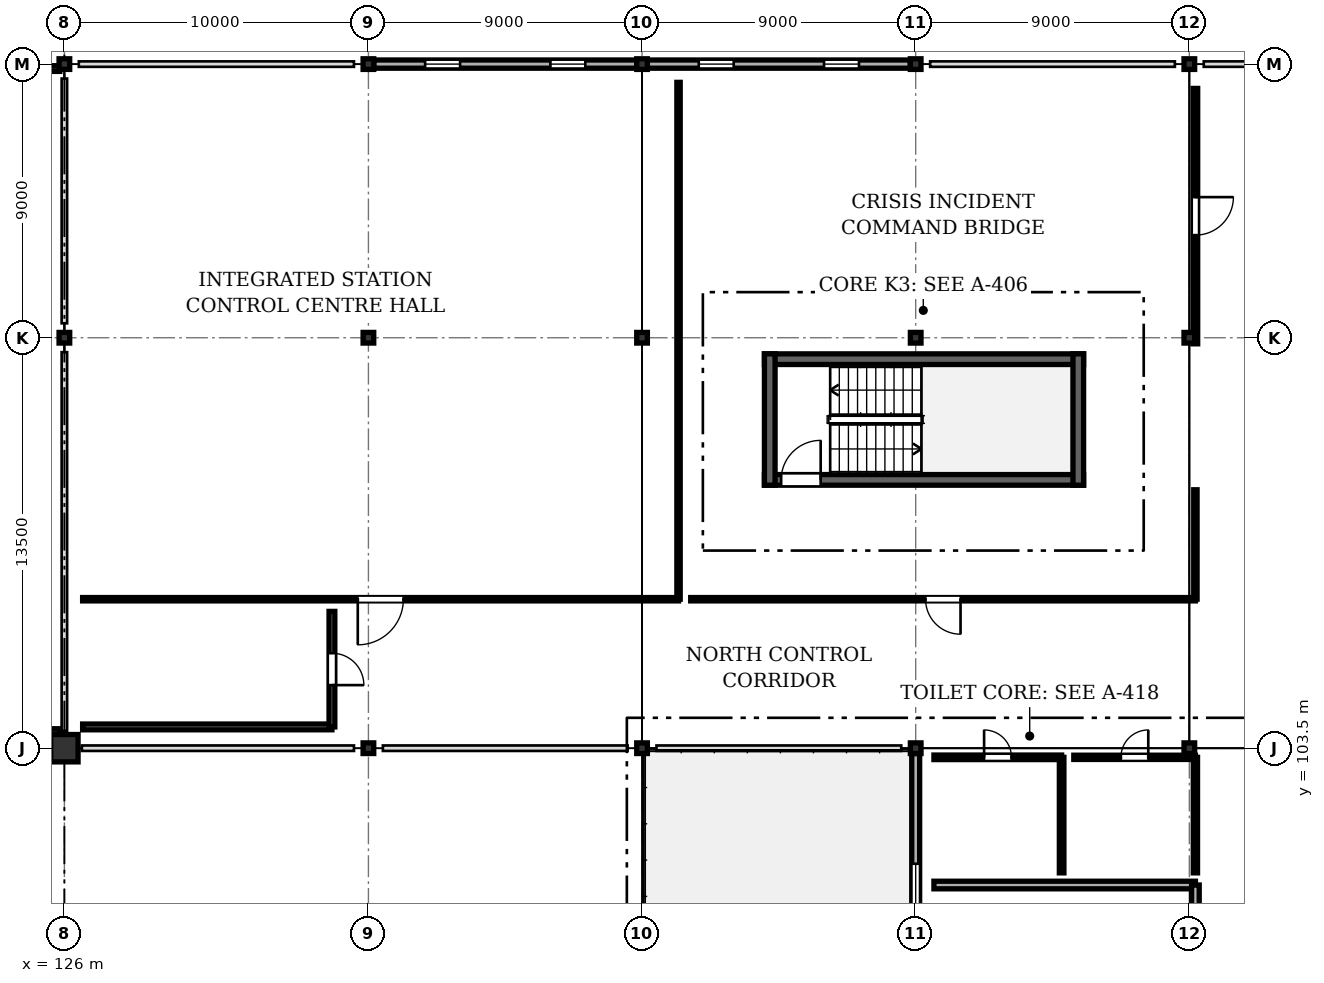
"""IFC4 building model, lengths in metres.
Left out: names, types, materials, properties, quantities, classifications, styles, units other than length and angle.
Written with IfcOpenShell. Run it as: python <this file> out.ifc"""

import sys

from ifc_helpers import new_model, si_unit, direction, frame, frame_2d, origin, origin_2d, place, context, subcontext, project, spatial, rectangle, i_section, extrude, element, fill, save


model = new_model("IFC4")
c1 = context("Model", 3, precision=1e-05, world=origin(), true_north=direction((0.0, 1.0)))
c2 = subcontext(c1, "Body", "Model", "MODEL_VIEW")
j1 = project(units=[si_unit("LENGTHUNIT", "METRE"), si_unit("PLANEANGLEUNIT", "RADIAN")], contexts=[c1])
p1 = place(None, origin())
s1 = spatial("IfcSite", under=j1, at=p1, CompositionType="ELEMENT")
p2 = place(p1, origin())
s2 = spatial("IfcBuilding", under=s1, at=p2, CompositionType="ELEMENT")
p3 = place(p2, frame((0.0, 0.0, 17.6)))
s3 = spatial("IfcBuildingStorey", under=s2, at=p3, CompositionType="ELEMENT", Elevation=17.6)
p4 = place(p3, frame((126.0, 103.5, 0.0), z_axis=(0.0, 0.0, 1.0), x_axis=(1.0, 0.0, 0.0)))
e1 = element("IfcColumn", 1, at=p4, inside=s3, PredefinedType="COLUMN", context=c2, shape_type="SweptSolid", body=[
    extrude(rectangle(XDim=0.9, YDim=0.9, at=origin_2d()), origin(), (0.0, 0.0, 1.0), 3.2),
])
for number, where, z_axis, x_axis in (
    (2, (126.0, 117.0, 0.0), (0.0, 0.0, 1.0), (1.0, 0.0, 0.0)),
    (3, (126.0, 126.0, 0.0), (0.0, 0.0, 1.0), (1.0, 0.0, 0.0)),
    (4, (136.0, 103.5, 0.0), (0.0, 0.0, 1.0), (1.0, 0.0, 0.0)),
    (5, (136.0, 117.0, 0.0), (0.0, 0.0, 1.0), (1.0, 0.0, 0.0)),
    (6, (136.0, 126.0, 0.0), (0.0, 0.0, 1.0), (1.0, 0.0, 0.0)),
    (7, (145.0, 103.5, 0.0), (0.0, 0.0, 1.0), (1.0, 0.0, 0.0)),
    (8, (145.0, 117.0, 0.0), (0.0, 0.0, 1.0), (1.0, 0.0, 0.0)),
    (9, (145.0, 126.0, 0.0), (0.0, 0.0, 1.0), (1.0, 0.0, 0.0)),
    (10, (154.0, 103.5, 0.0), (0.0, 0.0, 1.0), (1.0, 0.0, 0.0)),
    (11, (154.0, 117.0, 0.0), (0.0, 0.0, 1.0), (1.0, 0.0, 0.0)),
    (12, (154.0, 126.0, 0.0), (0.0, 0.0, 1.0), (1.0, 0.0, 0.0)),
    (13, (163.0, 103.5, 0.0), (0.0, 0.0, 1.0), (1.0, 0.0, 0.0)),
    (14, (163.0, 117.0, 0.0), (0.0, 0.0, 1.0), (1.0, 0.0, 0.0)),
    (15, (163.0, 126.0, 0.0), (0.0, 0.0, 1.0), (1.0, 0.0, 0.0)),
):
    element("IfcColumn", number, at=place(p3, frame(where, z_axis=z_axis, x_axis=x_axis)), inside=s3, PredefinedType="COLUMN", context=c2, shape_type="SweptSolid", body=[
        extrude(i_section(OverallWidth=0.35, OverallDepth=0.35, WebThickness=0.012, FlangeThickness=0.019, FilletRadius=0.02, at=origin_2d()), origin(), (0.0, 0.0, 1.0), 3.2),
    ])
p5 = place(p3, frame((136.175, 126.0, 0.0), z_axis=(0.0, 0.0, 1.0), x_axis=(1.0, 0.0, 0.0)))
e16 = element("IfcWall", 16, at=p5, inside=s3, PredefinedType="SOLIDWALL", context=c2, shape_type="SweptSolid", body=[
    extrude(rectangle(XDim=8.65, YDim=0.27, at=frame_2d((4.325, 0.0))), origin(), (0.0, 0.0, 1.0), 2.535),
])
p6 = place(p5, frame((1.69, 0.0, 0.9)))
e17 = element("IfcOpeningElement", 17, at=p6, cuts=e16, PredefinedType="OPENING", context=c2, shape_type="SweptSolid", body=[
    extrude(rectangle(XDim=1.15, YDim=1.45, at=frame_2d((0.575, 0.725))), frame((0.0, 0.145, 0.0), z_axis=(0.0, -1.0, 0.0), x_axis=(1.0, 0.0, 0.0)), (0.0, 0.0, 1.0), 0.29),
])
p7 = place(p5, frame((5.81, 0.0, 0.9)))
e18 = element("IfcOpeningElement", 18, at=p7, cuts=e16, PredefinedType="OPENING", context=c2, shape_type="SweptSolid", body=[
    extrude(rectangle(XDim=1.15, YDim=1.45, at=frame_2d((0.575, 0.725))), frame((0.0, 0.145, 0.0), z_axis=(0.0, -1.0, 0.0), x_axis=(1.0, 0.0, 0.0)), (0.0, 0.0, 1.0), 0.29),
])
p8 = place(p3, frame((145.175, 126.0, 0.0), z_axis=(0.0, 0.0, 1.0), x_axis=(1.0, 0.0, 0.0)))
e19 = element("IfcWall", 19, at=p8, inside=s3, PredefinedType="SOLIDWALL", context=c2, shape_type="SweptSolid", body=[
    extrude(rectangle(XDim=8.65, YDim=0.27, at=frame_2d((4.325, 0.0))), origin(), (0.0, 0.0, 1.0), 2.535),
])
p9 = place(p8, frame((1.69, 0.0, 0.9)))
e20 = element("IfcOpeningElement", 20, at=p9, cuts=e19, PredefinedType="OPENING", context=c2, shape_type="SweptSolid", body=[
    extrude(rectangle(XDim=1.15, YDim=1.45, at=frame_2d((0.575, 0.725))), frame((0.0, 0.145, 0.0), z_axis=(0.0, -1.0, 0.0), x_axis=(1.0, 0.0, 0.0)), (0.0, 0.0, 1.0), 0.29),
])
p10 = place(p8, frame((5.81, 0.0, 0.9)))
e21 = element("IfcOpeningElement", 21, at=p10, cuts=e19, PredefinedType="OPENING", context=c2, shape_type="SweptSolid", body=[
    extrude(rectangle(XDim=1.15, YDim=1.45, at=frame_2d((0.575, 0.725))), frame((0.0, 0.145, 0.0), z_axis=(0.0, -1.0, 0.0), x_axis=(1.0, 0.0, 0.0)), (0.0, 0.0, 1.0), 0.29),
])
p11 = place(p3, frame((154.0, 94.675, 0.0), z_axis=(0.0, 0.0, 1.0), x_axis=(0.0, 1.0, 0.0)))
e22 = element("IfcWall", 22, at=p11, inside=s3, PredefinedType="SOLIDWALL", context=c2, shape_type="SweptSolid", body=[
    extrude(rectangle(XDim=8.65, YDim=0.26, at=frame_2d((4.325, 0.0))), origin(), (0.0, 0.0, 1.0), 2.505),
])
p12 = place(p11, frame((3.625, 0.0, 0.75)))
e23 = element("IfcOpeningElement", 23, at=p12, cuts=e22, PredefinedType="OPENING", context=c2, shape_type="SweptSolid", body=[
    extrude(rectangle(XDim=1.4, YDim=1.55, at=frame_2d((0.7, 0.775))), frame((0.0, 0.14, 0.0), z_axis=(0.0, -1.0, 0.0), x_axis=(1.0, 0.0, 0.0)), (0.0, 0.0, 1.0), 0.28),
])
p13 = place(p3, frame((117.15, 104.05, 0.0), z_axis=(0.0, 0.0, 1.0), x_axis=(1.0, 0.0, 0.0)))
e24 = element("IfcWall", 24, at=p13, inside=s3, PredefinedType="PARAPET", context=c2, shape_type="SweptSolid", body=[
    extrude(rectangle(XDim=8.7, YDim=0.18, at=frame_2d((4.35, 0.0))), origin(), (0.0, 0.0, 1.0), 0.85),
])
p14 = place(p3, frame((117.15, 125.85, 0.0), z_axis=(0.0, 0.0, 1.0), x_axis=(1.0, 0.0, 0.0)))
e25 = element("IfcWall", 25, at=p14, inside=s3, PredefinedType="PARAPET", context=c2, shape_type="SweptSolid", body=[
    extrude(rectangle(XDim=8.7, YDim=0.18, at=frame_2d((4.35, 0.0))), origin(), (0.0, 0.0, 1.0), 1.15),
])
p15 = place(p3, frame((149.025, 112.325, 0.0), z_axis=(0.0, 0.0, 1.0), x_axis=(1.0, 0.0, 0.0)))
e26 = element("IfcWall", 26, at=p15, inside=s3, PredefinedType="SHEAR", context=c2, shape_type="SweptSolid", body=[
    extrude(rectangle(XDim=10.498, YDim=0.35, at=frame_2d((5.249, 0.0))), origin(), (0.0, 0.0, 1.0), 3.02),
])
p16 = place(p15, frame((0.55, 0.0, 0.0)))
e27 = element("IfcOpeningElement", 27, at=p16, cuts=e26, PredefinedType="OPENING", context=c2, shape_type="SweptSolid", body=[
    extrude(rectangle(XDim=1.3, YDim=2.1, at=frame_2d((0.65, 1.05))), frame((0.0, 0.185, 0.0), z_axis=(0.0, -1.0, 0.0), x_axis=(1.0, 0.0, 0.0)), (0.0, 0.0, 1.0), 0.37),
])
p17 = place(p3, frame((159.522, 116.295, 0.0), z_axis=(0.0, 0.0, 1.0), x_axis=(-1.0, 0.0, 0.0)))
e28 = element("IfcWall", 28, at=p17, inside=s3, PredefinedType="SHEAR", context=c2, shape_type="SweptSolid", body=[
    extrude(rectangle(XDim=10.498, YDim=0.35, at=frame_2d((5.249, 0.0))), origin(), (0.0, 0.0, 1.0), 3.02),
])
for number, where, z_axis, x_axis in (
    (29, (159.347, 112.15, 0.0), (0.0, 0.0, 1.0), (0.0, 1.0, 0.0)),
    (30, (149.2, 116.47, 0.0), (0.0, 0.0, 1.0), (0.0, -1.0, 0.0)),
):
    element("IfcWall", number, at=place(p3, frame(where, z_axis=z_axis, x_axis=x_axis)), inside=s3, PredefinedType="SHEAR", context=c2, shape_type="SweptSolid", body=[
        extrude(rectangle(XDim=4.32, YDim=0.35, at=frame_2d((2.16, 0.0))), origin(), (0.0, 0.0, 1.0), 3.02),
    ])
p18 = place(p3, frame((146.2, 108.4, 0.0), z_axis=(0.0, 0.0, 1.0), x_axis=(-1.0, 0.0, 0.0)))
e31 = element("IfcWall", 31, at=p18, inside=s3, PredefinedType="PARTITIONING", context=c2, shape_type="SweptSolid", body=[
    extrude(rectangle(XDim=19.6, YDim=0.11, at=frame_2d((9.8, 0.0))), origin(), (0.0, 0.0, 1.0), 2.395),
])
p19 = place(p18, frame((9.05, 0.0, 0.0)))
e32 = element("IfcOpeningElement", 32, at=p19, cuts=e31, PredefinedType="OPENING", context=c2, shape_type="SweptSolid", body=[
    extrude(rectangle(XDim=1.5, YDim=2.15, at=frame_2d((0.75, 1.075))), frame((0.0, 0.065, 0.0), z_axis=(0.0, -1.0, 0.0), x_axis=(1.0, 0.0, 0.0)), (0.0, 0.0, 1.0), 0.13),
])
p20 = place(p3, frame((146.2, 125.4, 0.0), z_axis=(0.0, 0.0, 1.0), x_axis=(0.0, -1.0, 0.0)))
e33 = element("IfcWall", 33, at=p20, inside=s3, PredefinedType="PARTITIONING", context=c2, shape_type="SweptSolid", body=[
    extrude(rectangle(XDim=17.0, YDim=0.11, at=frame_2d((8.5, 0.0))), origin(), (0.0, 0.0, 1.0), 2.535),
])
p21 = place(p3, frame((154.6, 99.0, 0.0), z_axis=(0.0, 0.0, 1.0), x_axis=(1.0, 0.0, 0.0)))
e34 = element("IfcWall", 34, at=p21, inside=s3, PredefinedType="SOLIDWALL", context=c2, shape_type="SweptSolid", body=[
    extrude(rectangle(XDim=8.6, YDim=0.25, at=frame_2d((4.3, 0.0))), origin(), (0.0, 0.0, 1.0), 2.555),
])
p22 = place(p3, frame((163.2, 99.0, 0.0), z_axis=(0.0, 0.0, 1.0), x_axis=(0.0, -1.0, 0.0)))
e35 = element("IfcWall", 35, at=p22, inside=s3, PredefinedType="SOLIDWALL", context=c2, shape_type="SweptSolid", body=[
    extrude(rectangle(XDim=8.4, YDim=0.25, at=frame_2d((4.2, 0.0))), origin(), (0.0, 0.0, 1.0), 2.505),
])
p23 = place(p22, frame((2.55, 0.0, 0.0)))
e36 = element("IfcOpeningElement", 36, at=p23, cuts=e35, PredefinedType="OPENING", context=c2, shape_type="SweptSolid", body=[
    extrude(rectangle(XDim=1.3, YDim=2.1, at=frame_2d((0.65, 1.05))), frame((0.0, 0.135, 0.0), z_axis=(0.0, -1.0, 0.0), x_axis=(1.0, 0.0, 0.0)), (0.0, 0.0, 1.0), 0.27),
])
p24 = place(p3, frame((163.2, 125.2, 0.0), z_axis=(0.0, 0.0, 1.0), x_axis=(0.0, -1.0, 0.0)))
e37 = element("IfcWall", 37, at=p24, inside=s3, PredefinedType="PARTITIONING", context=c2, shape_type="SweptSolid", body=[
    extrude(rectangle(XDim=8.4, YDim=0.15, at=frame_2d((4.2, 0.0))), origin(), (0.0, 0.0, 1.0), 2.355),
])
p25 = place(p24, frame((3.575, 0.0, 0.0)))
e38 = element("IfcOpeningElement", 38, at=p25, cuts=e37, PredefinedType="OPENING", context=c2, shape_type="SweptSolid", body=[
    extrude(rectangle(XDim=1.25, YDim=2.1, at=frame_2d((0.625, 1.05))), frame((0.0, 0.085, 0.0), z_axis=(0.0, -1.0, 0.0), x_axis=(1.0, 0.0, 0.0)), (0.0, 0.0, 1.0), 0.17),
])
p26 = place(p3, frame((163.2, 108.4, 0.0), z_axis=(0.0, 0.0, 1.0), x_axis=(-1.0, 0.0, 0.0)))
e39 = element("IfcWall", 39, at=p26, inside=s3, PredefinedType="PARTITIONING", context=c2, shape_type="SweptSolid", body=[
    extrude(rectangle(XDim=16.6, YDim=0.11, at=frame_2d((8.3, 0.0))), origin(), (0.0, 0.0, 1.0), 2.355),
])
p27 = place(p26, frame((7.725, 0.0, 0.0)))
e40 = element("IfcOpeningElement", 40, at=p27, cuts=e39, PredefinedType="OPENING", context=c2, shape_type="SweptSolid", body=[
    extrude(rectangle(XDim=1.15, YDim=2.1, at=frame_2d((0.575, 1.05))), frame((0.0, 0.065, 0.0), z_axis=(0.0, -1.0, 0.0), x_axis=(1.0, 0.0, 0.0)), (0.0, 0.0, 1.0), 0.13),
])
p28 = place(p3, frame((163.2, 112.0, 0.0), z_axis=(0.0, 0.0, 1.0), x_axis=(0.0, -1.0, 0.0)))
e41 = element("IfcWall", 41, at=p28, inside=s3, PredefinedType="PARTITIONING", context=c2, shape_type="SweptSolid", body=[
    extrude(rectangle(XDim=3.6, YDim=0.11, at=frame_2d((1.8, 0.0))), origin(), (0.0, 0.0, 1.0), 2.355),
])
p29 = place(p3, frame((154.6, 103.2, 0.0), z_axis=(0.0, 0.0, 1.0), x_axis=(1.0, 0.0, 0.0)))
e42 = element("IfcWall", 42, at=p29, inside=s3, PredefinedType="PARTITIONING", context=c2, shape_type="SweptSolid", body=[
    extrude(rectangle(XDim=4.2, YDim=0.15, at=frame_2d((2.1, 0.0))), origin(), (0.0, 0.0, 1.0), 2.505),
])
p30 = place(p29, frame((1.65, 0.0, 0.0)))
e43 = element("IfcOpeningElement", 43, at=p30, cuts=e42, PredefinedType="OPENING", context=c2, shape_type="SweptSolid", body=[
    extrude(rectangle(XDim=0.9, YDim=2.1, at=frame_2d((0.45, 1.05))), frame((0.0, 0.085, 0.0), z_axis=(0.0, -1.0, 0.0), x_axis=(1.0, 0.0, 0.0)), (0.0, 0.0, 1.0), 0.17),
])
p31 = place(p3, frame((158.8, 103.2, 0.0), z_axis=(0.0, 0.0, 1.0), x_axis=(0.0, -1.0, 0.0)))
e44 = element("IfcWall", 44, at=p31, inside=s3, PredefinedType="PARTITIONING", context=c2, shape_type="SweptSolid", body=[
    extrude(rectangle(XDim=3.8, YDim=0.15, at=frame_2d((1.9, 0.0))), origin(), (0.0, 0.0, 1.0), 2.505),
])
p32 = place(p3, frame((159.2, 103.2, 0.0), z_axis=(0.0, 0.0, 1.0), x_axis=(1.0, 0.0, 0.0)))
e45 = element("IfcWall", 45, at=p32, inside=s3, PredefinedType="PARTITIONING", context=c2, shape_type="SweptSolid", body=[
    extrude(rectangle(XDim=4.0, YDim=0.14, at=frame_2d((2.0, 0.0))), origin(), (0.0, 0.0, 1.0), 2.355),
])
p33 = place(p32, frame((1.55, 0.0, 0.0)))
e46 = element("IfcOpeningElement", 46, at=p33, cuts=e45, PredefinedType="OPENING", context=c2, shape_type="SweptSolid", body=[
    extrude(rectangle(XDim=0.9, YDim=2.1, at=frame_2d((0.45, 1.05))), frame((0.0, 0.08, 0.0), z_axis=(0.0, -1.0, 0.0), x_axis=(1.0, 0.0, 0.0)), (0.0, 0.0, 1.0), 0.16),
])
p34 = place(p3, frame((163.2, 103.2, 0.0), z_axis=(0.0, 0.0, 1.0), x_axis=(0.0, -1.0, 0.0)))
e47 = element("IfcWall", 47, at=p34, inside=s3, PredefinedType="PARTITIONING", context=c2, shape_type="SweptSolid", body=[
    extrude(rectangle(XDim=3.8, YDim=0.14, at=frame_2d((1.9, 0.0))), origin(), (0.0, 0.0, 1.0), 2.355),
])
p35 = place(p3, frame((134.8, 104.2, 0.0), z_axis=(0.0, 0.0, 1.0), x_axis=(-1.0, 0.0, 0.0)))
e48 = element("IfcWall", 48, at=p35, inside=s3, PredefinedType="PARTITIONING", context=c2, shape_type="SweptSolid", body=[
    extrude(rectangle(XDim=8.2, YDim=0.19, at=frame_2d((4.1, 0.0))), origin(), (0.0, 0.0, 1.0), 2.41),
])
p36 = place(p3, frame((134.8, 108.0, 0.0), z_axis=(0.0, 0.0, 1.0), x_axis=(0.0, -1.0, 0.0)))
e49 = element("IfcWall", 49, at=p36, inside=s3, PredefinedType="PARTITIONING", context=c2, shape_type="SweptSolid", body=[
    extrude(rectangle(XDim=3.8, YDim=0.19, at=frame_2d((1.9, 0.0))), origin(), (0.0, 0.0, 1.0), 2.51),
])
p37 = place(p36, frame((1.375, 0.0, 0.0)))
e50 = element("IfcOpeningElement", 50, at=p37, cuts=e49, PredefinedType="OPENING", context=c2, shape_type="SweptSolid", body=[
    extrude(rectangle(XDim=1.05, YDim=2.1, at=frame_2d((0.525, 1.05))), frame((0.0, 0.105, 0.0), z_axis=(0.0, -1.0, 0.0), x_axis=(1.0, 0.0, 0.0)), (0.0, 0.0, 1.0), 0.21),
])
p38 = place(p6, origin())
e51 = element("IfcWindow", 51, at=p38, inside=s3, PartitioningType="SINGLE_PANEL", PredefinedType="WINDOW", context=c2, shape_type="SweptSolid", body=[
    extrude(rectangle(XDim=1.15, YDim=1.45, at=frame_2d((0.575, 0.725))), frame((0.0, 0.03, 0.0), z_axis=(0.0, -1.0, 0.0), x_axis=(1.0, 0.0, 0.0)), (0.0, 0.0, 1.0), 0.06),
])
fill(e17, e51)
p39 = place(p7, origin())
e52 = element("IfcWindow", 52, at=p39, inside=s3, PartitioningType="SINGLE_PANEL", PredefinedType="WINDOW", context=c2, shape_type="SweptSolid", body=[
    extrude(rectangle(XDim=1.15, YDim=1.45, at=frame_2d((0.575, 0.725))), frame((0.0, 0.03, 0.0), z_axis=(0.0, -1.0, 0.0), x_axis=(1.0, 0.0, 0.0)), (0.0, 0.0, 1.0), 0.06),
])
fill(e18, e52)
p40 = place(p9, origin())
e53 = element("IfcWindow", 53, at=p40, inside=s3, PartitioningType="SINGLE_PANEL", PredefinedType="WINDOW", context=c2, shape_type="SweptSolid", body=[
    extrude(rectangle(XDim=1.15, YDim=1.45, at=frame_2d((0.575, 0.725))), frame((0.0, 0.03, 0.0), z_axis=(0.0, -1.0, 0.0), x_axis=(1.0, 0.0, 0.0)), (0.0, 0.0, 1.0), 0.06),
])
fill(e20, e53)
p41 = place(p10, origin())
e54 = element("IfcWindow", 54, at=p41, inside=s3, PartitioningType="SINGLE_PANEL", PredefinedType="WINDOW", context=c2, shape_type="SweptSolid", body=[
    extrude(rectangle(XDim=1.15, YDim=1.45, at=frame_2d((0.575, 0.725))), frame((0.0, 0.03, 0.0), z_axis=(0.0, -1.0, 0.0), x_axis=(1.0, 0.0, 0.0)), (0.0, 0.0, 1.0), 0.06),
])
fill(e21, e54)
p42 = place(p12, origin())
e55 = element("IfcWindow", 55, at=p42, inside=s3, PartitioningType="SINGLE_PANEL", PredefinedType="WINDOW", context=c2, shape_type="SweptSolid", body=[
    extrude(rectangle(XDim=1.4, YDim=1.55, at=frame_2d((0.7, 0.775))), frame((0.0, 0.03, 0.0), z_axis=(0.0, -1.0, 0.0), x_axis=(1.0, 0.0, 0.0)), (0.0, 0.0, 1.0), 0.06),
])
fill(e23, e55)
p43 = place(p16, origin())
e56 = element("IfcDoor", 56, at=p43, inside=s3, OperationType="SINGLE_SWING_RIGHT", PredefinedType="DOOR", context=c2, shape_type="SweptSolid", body=[
    extrude(rectangle(XDim=1.3, YDim=2.1, at=frame_2d((0.65, 1.05))), frame((0.0, 0.025, 0.0), z_axis=(0.0, -1.0, 0.0), x_axis=(1.0, 0.0, 0.0)), (0.0, 0.0, 1.0), 0.05),
])
fill(e27, e56)
p44 = place(p19, origin())
e57 = element("IfcDoor", 57, at=p44, inside=s3, OperationType="SINGLE_SWING_RIGHT", PredefinedType="DOOR", context=c2, shape_type="SweptSolid", body=[
    extrude(rectangle(XDim=1.5, YDim=2.15, at=frame_2d((0.75, 1.075))), frame((0.0, 0.025, 0.0), z_axis=(0.0, -1.0, 0.0), x_axis=(1.0, 0.0, 0.0)), (0.0, 0.0, 1.0), 0.05),
])
fill(e32, e57)
p45 = place(p25, origin())
e58 = element("IfcDoor", 58, at=p45, inside=s3, OperationType="SINGLE_SWING_LEFT", PredefinedType="DOOR", context=c2, shape_type="SweptSolid", body=[
    extrude(rectangle(XDim=1.25, YDim=2.1, at=frame_2d((0.625, 1.05))), frame((0.0, 0.025, 0.0), z_axis=(0.0, -1.0, 0.0), x_axis=(1.0, 0.0, 0.0)), (0.0, 0.0, 1.0), 0.05),
])
fill(e38, e58)
p46 = place(p27, origin())
e59 = element("IfcDoor", 59, at=p46, inside=s3, OperationType="SINGLE_SWING_LEFT", PredefinedType="DOOR", context=c2, shape_type="SweptSolid", body=[
    extrude(rectangle(XDim=1.15, YDim=2.1, at=frame_2d((0.575, 1.05))), frame((0.0, 0.025, 0.0), z_axis=(0.0, -1.0, 0.0), x_axis=(1.0, 0.0, 0.0)), (0.0, 0.0, 1.0), 0.05),
])
fill(e40, e59)
p47 = place(p30, origin())
e60 = element("IfcDoor", 60, at=p47, inside=s3, OperationType="SINGLE_SWING_LEFT", PredefinedType="DOOR", context=c2, shape_type="SweptSolid", body=[
    extrude(rectangle(XDim=0.9, YDim=2.1, at=frame_2d((0.45, 1.05))), frame((0.0, 0.025, 0.0), z_axis=(0.0, -1.0, 0.0), x_axis=(1.0, 0.0, 0.0)), (0.0, 0.0, 1.0), 0.05),
])
fill(e43, e60)
p48 = place(p33, origin())
e61 = element("IfcDoor", 61, at=p48, inside=s3, OperationType="SINGLE_SWING_RIGHT", PredefinedType="DOOR", context=c2, shape_type="SweptSolid", body=[
    extrude(rectangle(XDim=0.9, YDim=2.1, at=frame_2d((0.45, 1.05))), frame((0.0, 0.025, 0.0), z_axis=(0.0, -1.0, 0.0), x_axis=(1.0, 0.0, 0.0)), (0.0, 0.0, 1.0), 0.05),
])
fill(e46, e61)
p49 = place(p37, origin())
e62 = element("IfcDoor", 62, at=p49, inside=s3, OperationType="SINGLE_SWING_RIGHT", PredefinedType="DOOR", context=c2, shape_type="SweptSolid", body=[
    extrude(rectangle(XDim=1.05, YDim=2.1, at=frame_2d((0.525, 1.05))), frame((0.0, 0.025, 0.0), z_axis=(0.0, -1.0, 0.0), x_axis=(1.0, 0.0, 0.0)), (0.0, 0.0, 1.0), 0.05),
])
fill(e50, e62)
save(model, sys.argv[1])
